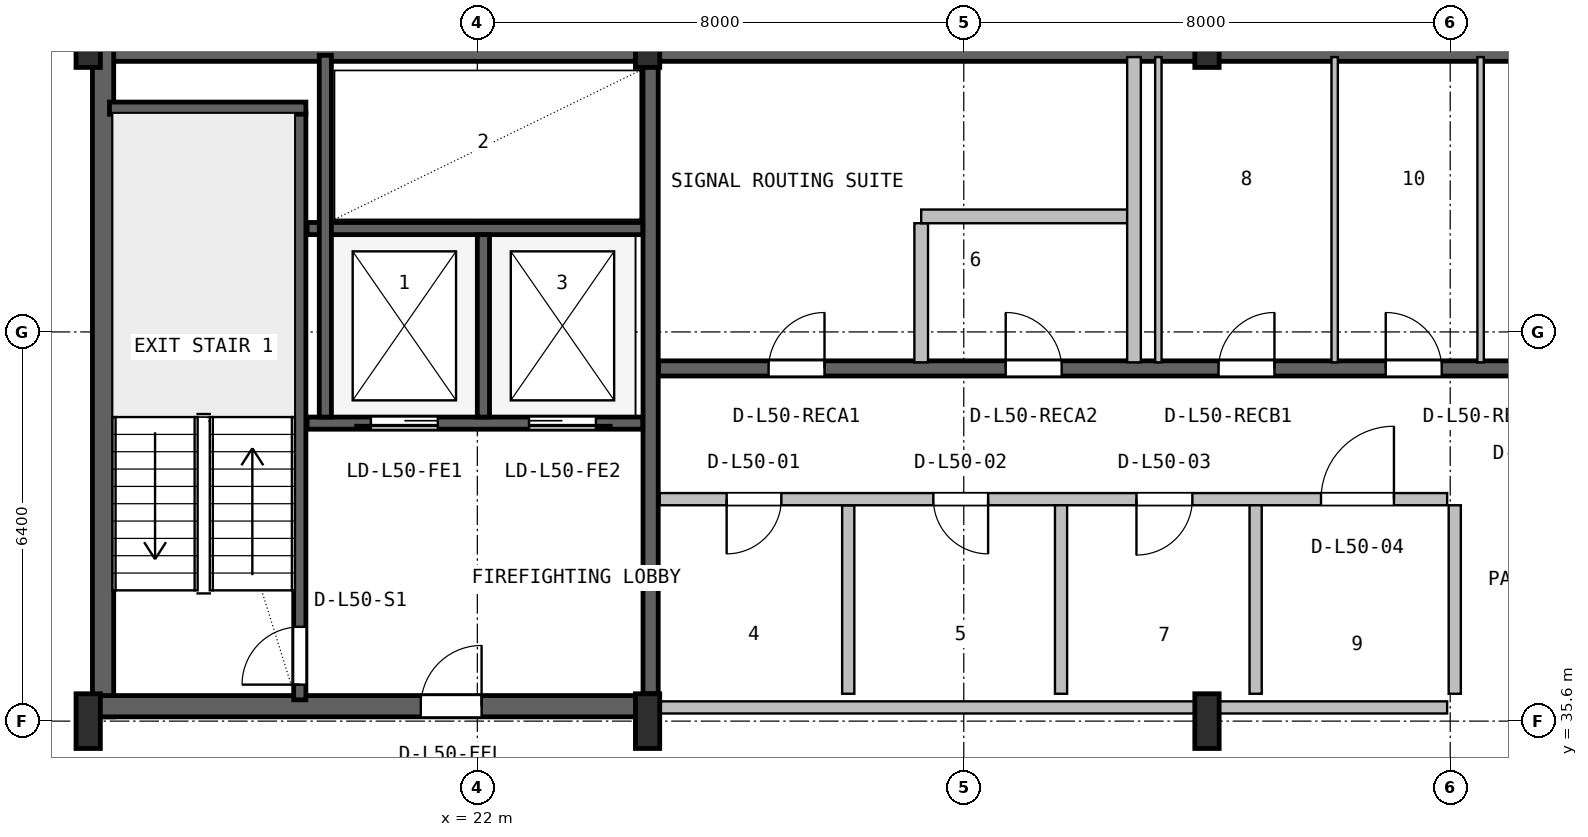
"""IFC4 building model, lengths in metres.
Left out: names, types, materials, properties, quantities, classifications, styles, units other than length and angle.
Written with IfcOpenShell. Run it as: python <this file> out.ifc"""

import sys

from ifc_helpers import new_model, si_unit, direction, frame, frame_2d, origin, origin_2d, place, context, subcontext, project, spatial, rectangle, i_section, extrude, source, transform, mapped, element, fill, save


model = new_model("IFC4")
c1 = context("Model", 3, precision=1e-05, world=origin(), true_north=direction((0.0, 1.0)))
c2 = subcontext(c1, "Body", "Model", "MODEL_VIEW")
j1 = project(units=[si_unit("LENGTHUNIT", "METRE"), si_unit("PLANEANGLEUNIT", "RADIAN")], contexts=[c1])
p1 = place(None, origin())
s1 = spatial("IfcSite", under=j1, at=p1, CompositionType="ELEMENT")
p2 = place(p1, origin())
s2 = spatial("IfcBuilding", under=s1, at=p2, CompositionType="ELEMENT")
p3 = place(p2, frame((0.0, 0.0, 203.6)))
s3 = spatial("IfcBuildingStorey", under=s2, at=p3, CompositionType="ELEMENT", Elevation=203.6)
p4 = place(p3, frame((15.6, 46.625, 0.0), z_axis=(0.0, 0.0, 1.0), x_axis=(1.0, 0.0, 0.0)))
e1 = element("IfcWall", 1, at=p4, inside=s3, PredefinedType="SHEAR", context=c2, shape_type="SweptSolid", body=[
    extrude(rectangle(XDim=36.8, YDim=0.35, at=frame_2d((18.4, 0.0))), origin(), (0.0, 0.0, 1.0), 3.55),
])
p5 = place(p3, frame((15.845, 35.67, 0.0), z_axis=(0.0, 0.0, 1.0), x_axis=(0.0, 1.0, 0.0)))
e2 = element("IfcWall", 2, at=p5, inside=s3, PredefinedType="SHEAR", context=c2, shape_type="SweptSolid", body=[
    extrude(rectangle(XDim=11.13, YDim=0.35, at=frame_2d((5.565, 0.0))), origin(), (0.0, 0.0, 1.0), 3.55),
])
p6 = place(p3, frame((15.67, 35.845, 0.0), z_axis=(0.0, 0.0, 1.0), x_axis=(1.0, 0.0, 0.0)))
e3 = element("IfcWall", 3, at=p6, inside=s3, PredefinedType="SHEAR", context=c2, shape_type="SweptSolid", body=[
    extrude(rectangle(XDim=9.13, YDim=0.35, at=frame_2d((4.565, 0.0))), origin(), (0.0, 0.0, 1.0), 3.55),
])
p7 = place(p6, frame((5.4, 0.0, 0.0)))
e4 = element("IfcOpeningElement", 4, at=p7, cuts=e3, PredefinedType="OPENING", context=c2, shape_type="SweptSolid", body=[
    extrude(rectangle(XDim=1.0, YDim=2.1, at=frame_2d((0.5, 1.05))), frame((0.0, 0.185, 0.0), z_axis=(0.0, -1.0, 0.0), x_axis=(1.0, 0.0, 0.0)), (0.0, 0.0, 1.0), 0.37),
])
m1 = source(origin(), c2, "Body", "SweptSolid", [
    extrude(i_section(OverallWidth=0.4, OverallDepth=0.9, WebThickness=0.016, FlangeThickness=0.028, FilletRadius=0.016, at=origin_2d()), origin(), (0.0, 0.0, 1.0), 3.8),
])
for number, where, z_axis, x_axis in (
    (5, (15.6, 35.6, 0.0), (0.0, 0.0, 1.0), (1.0, 0.0, 0.0)),
    (6, (15.6, 46.8, 0.0), (0.0, 0.0, 1.0), (1.0, 0.0, 0.0)),
    (7, (24.8, 35.6, 0.0), (0.0, 0.0, 1.0), (1.0, 0.0, 0.0)),
    (8, (24.8, 46.8, 0.0), (0.0, 0.0, 1.0), (1.0, 0.0, 0.0)),
    (9, (34.0, 35.6, 0.0), (0.0, 0.0, 1.0), (1.0, 0.0, 0.0)),
    (10, (34.0, 46.8, 0.0), (0.0, 0.0, 1.0), (1.0, 0.0, 0.0)),
):
    element("IfcColumn", number, at=place(p3, frame(where, z_axis=z_axis, x_axis=x_axis)), inside=s3, PredefinedType="COLUMN", context=c2, shape_type="MappedRepresentation", body=[
        mapped(m1, transform((0.0, 0.0, 0.0), x_axis=(1.0, 0.0, 0.0), y_axis=(0.0, 1.0, 0.0), z_axis=(0.0, 0.0, 1.0), scale=1.0)),
    ])
p8 = place(p3, frame((19.08, 35.95, 0.0), z_axis=(0.0, 0.0, 1.0), x_axis=(0.0, 1.0, 0.0)))
e11 = element("IfcWall", 11, at=p8, inside=s3, PredefinedType="SHEAR", context=c2, shape_type="SweptSolid", body=[
    extrude(rectangle(XDim=9.65, YDim=0.2, at=frame_2d((4.825, 0.0))), origin(), (0.0, 0.0, 1.0), 3.55),
])
p9 = place(p8, frame((0.25, 0.0, 0.0)))
e12 = element("IfcOpeningElement", 12, at=p9, cuts=e11, PredefinedType="OPENING", context=c2, shape_type="SweptSolid", body=[
    extrude(rectangle(XDim=0.95, YDim=2.1, at=frame_2d((0.475, 1.05))), frame((0.0, 0.11, 0.0), z_axis=(0.0, -1.0, 0.0), x_axis=(1.0, 0.0, 0.0)), (0.0, 0.0, 1.0), 0.22),
])
p10 = place(p3, frame((15.95, 45.68, 0.0), z_axis=(0.0, 0.0, 1.0), x_axis=(1.0, 0.0, 0.0)))
e13 = element("IfcWall", 13, at=p10, inside=s3, PredefinedType="SHEAR", context=c2, shape_type="SweptSolid", body=[
    extrude(rectangle(XDim=3.23, YDim=0.2, at=frame_2d((1.615, 0.0))), origin(), (0.0, 0.0, 1.0), 3.55),
])
p11 = place(p3, frame((24.85, 36.05, 0.0), z_axis=(0.0, 0.0, 1.0), x_axis=(0.0, 1.0, 0.0)))
e14 = element("IfcWall", 14, at=p11, inside=s3, PredefinedType="SHEAR", context=c2, shape_type="SweptSolid", body=[
    extrude(rectangle(XDim=10.45, YDim=0.25, at=frame_2d((5.225, 0.0))), origin(), (0.0, 0.0, 1.0), 3.55),
])
p12 = place(p3, frame((19.2, 40.5, 0.0), z_axis=(0.0, 0.0, 1.0), x_axis=(1.0, 0.0, 0.0)))
e15 = element("IfcWall", 15, at=p12, inside=s3, PredefinedType="SHEAR", context=c2, shape_type="SweptSolid", body=[
    extrude(rectangle(XDim=5.52, YDim=0.2, at=frame_2d((2.76, 0.0))), origin(), (0.0, 0.0, 1.0), 3.55),
])
p13 = place(p12, frame((1.05, 0.0, 0.0)))
e16 = element("IfcOpeningElement", 16, at=p13, cuts=e15, PredefinedType="OPENING", context=c2, shape_type="SweptSolid", body=[
    extrude(rectangle(XDim=1.1, YDim=2.18, at=frame_2d((0.55, 1.09))), frame((0.0, 0.11, 0.0), z_axis=(0.0, -1.0, 0.0), x_axis=(1.0, 0.0, 0.0)), (0.0, 0.0, 1.0), 0.22),
])
p14 = place(p12, frame((3.65, 0.0, 0.0)))
e17 = element("IfcOpeningElement", 17, at=p14, cuts=e15, PredefinedType="OPENING", context=c2, shape_type="SweptSolid", body=[
    extrude(rectangle(XDim=1.1, YDim=2.18, at=frame_2d((0.55, 1.09))), frame((0.0, 0.11, 0.0), z_axis=(0.0, -1.0, 0.0), x_axis=(1.0, 0.0, 0.0)), (0.0, 0.0, 1.0), 0.22),
])
p15 = place(p3, frame((19.2, 43.7, 0.0), z_axis=(0.0, 0.0, 1.0), x_axis=(1.0, 0.0, 0.0)))
e18 = element("IfcWall", 18, at=p15, inside=s3, PredefinedType="SHEAR", context=c2, shape_type="SweptSolid", body=[
    extrude(rectangle(XDim=5.52, YDim=0.2, at=frame_2d((2.76, 0.0))), origin(), (0.0, 0.0, 1.0), 3.55),
])
p16 = place(p3, frame((22.1, 40.6, 0.0), z_axis=(0.0, 0.0, 1.0), x_axis=(0.0, 1.0, 0.0)))
e19 = element("IfcWall", 19, at=p16, inside=s3, PredefinedType="SHEAR", context=c2, shape_type="SweptSolid", body=[
    extrude(rectangle(XDim=3.0, YDim=0.2, at=frame_2d((1.5, 0.0))), origin(), (0.0, 0.0, 1.0), 3.55),
])
p17 = place(p3, frame((19.5, 40.6, 0.0), z_axis=(0.0, 0.0, 1.0), x_axis=(0.0, 1.0, 0.0)))
e20 = element("IfcWall", 20, at=p17, inside=s3, PredefinedType="SHEAR", context=c2, shape_type="SweptSolid", body=[
    extrude(rectangle(XDim=5.95, YDim=0.2, at=frame_2d((2.975, 0.0))), origin(), (0.0, 0.0, 1.0), 3.55),
])
p18 = place(p3, frame((24.98, 41.4, 0.0), z_axis=(0.0, 0.0, 1.0), x_axis=(1.0, 0.0, 0.0)))
e21 = element("IfcWall", 21, at=p18, inside=s3, PredefinedType="SHEAR", context=c2, shape_type="SweptSolid", body=[
    extrude(rectangle(XDim=23.82, YDim=0.25, at=frame_2d((11.91, 0.0))), origin(), (0.0, 0.0, 1.0), 3.55),
])
p19 = place(p18, frame((16.87, 0.0, 0.0)))
e22 = element("IfcOpeningElement", 22, at=p19, cuts=e21, PredefinedType="OPENING", context=c2, shape_type="SweptSolid", body=[
    extrude(rectangle(XDim=1.1, YDim=2.18, at=frame_2d((0.55, 1.09))), frame((0.0, 0.135, 0.0), z_axis=(0.0, -1.0, 0.0), x_axis=(1.0, 0.0, 0.0)), (0.0, 0.0, 1.0), 0.27),
])
p20 = place(p18, frame((19.47, 0.0, 0.0)))
e23 = element("IfcOpeningElement", 23, at=p20, cuts=e21, PredefinedType="OPENING", context=c2, shape_type="SweptSolid", body=[
    extrude(rectangle(XDim=1.1, YDim=2.18, at=frame_2d((0.55, 1.09))), frame((0.0, 0.135, 0.0), z_axis=(0.0, -1.0, 0.0), x_axis=(1.0, 0.0, 0.0)), (0.0, 0.0, 1.0), 0.27),
])
p21 = place(p18, frame((22.07, 0.0, 0.0)))
e24 = element("IfcOpeningElement", 24, at=p21, cuts=e21, PredefinedType="OPENING", context=c2, shape_type="SweptSolid", body=[
    extrude(rectangle(XDim=1.1, YDim=2.18, at=frame_2d((0.55, 1.09))), frame((0.0, 0.135, 0.0), z_axis=(0.0, -1.0, 0.0), x_axis=(1.0, 0.0, 0.0)), (0.0, 0.0, 1.0), 0.27),
])
p22 = place(p18, frame((1.81, 0.0, 0.0)))
e25 = element("IfcOpeningElement", 25, at=p22, cuts=e21, PredefinedType="OPENING", context=c2, shape_type="SweptSolid", body=[
    extrude(rectangle(XDim=0.92, YDim=2.08, at=frame_2d((0.46, 1.04))), frame((0.0, 0.135, 0.0), z_axis=(0.0, -1.0, 0.0), x_axis=(1.0, 0.0, 0.0)), (0.0, 0.0, 1.0), 0.27),
])
p23 = place(p18, frame((5.71, 0.0, 0.0)))
e26 = element("IfcOpeningElement", 26, at=p23, cuts=e21, PredefinedType="OPENING", context=c2, shape_type="SweptSolid", body=[
    extrude(rectangle(XDim=0.92, YDim=2.08, at=frame_2d((0.46, 1.04))), frame((0.0, 0.135, 0.0), z_axis=(0.0, -1.0, 0.0), x_axis=(1.0, 0.0, 0.0)), (0.0, 0.0, 1.0), 0.27),
])
p24 = place(p18, frame((9.21, 0.0, 0.0)))
e27 = element("IfcOpeningElement", 27, at=p24, cuts=e21, PredefinedType="OPENING", context=c2, shape_type="SweptSolid", body=[
    extrude(rectangle(XDim=0.92, YDim=2.08, at=frame_2d((0.46, 1.04))), frame((0.0, 0.135, 0.0), z_axis=(0.0, -1.0, 0.0), x_axis=(1.0, 0.0, 0.0)), (0.0, 0.0, 1.0), 0.27),
])
p25 = place(p18, frame((11.96, 0.0, 0.0)))
e28 = element("IfcOpeningElement", 28, at=p25, cuts=e21, PredefinedType="OPENING", context=c2, shape_type="SweptSolid", body=[
    extrude(rectangle(XDim=0.92, YDim=2.08, at=frame_2d((0.46, 1.04))), frame((0.0, 0.135, 0.0), z_axis=(0.0, -1.0, 0.0), x_axis=(1.0, 0.0, 0.0)), (0.0, 0.0, 1.0), 0.27),
])
p26 = place(p18, frame((14.31, 0.0, 0.0)))
e29 = element("IfcOpeningElement", 29, at=p26, cuts=e21, PredefinedType="OPENING", context=c2, shape_type="SweptSolid", body=[
    extrude(rectangle(XDim=0.92, YDim=2.08, at=frame_2d((0.46, 1.04))), frame((0.0, 0.135, 0.0), z_axis=(0.0, -1.0, 0.0), x_axis=(1.0, 0.0, 0.0)), (0.0, 0.0, 1.0), 0.27),
])
p27 = place(p3, frame((25.0, 35.825, 0.0), z_axis=(0.0, 0.0, 1.0), x_axis=(1.0, 0.0, 0.0)))
e30 = element("IfcWall", 30, at=p27, inside=s3, PredefinedType="SOLIDWALL", context=c2, shape_type="SweptSolid", body=[
    extrude(rectangle(XDim=12.95, YDim=0.2, at=frame_2d((6.475, 0.0))), origin(), (0.0, 0.0, 1.0), 2.575),
])
p28 = place(p3, frame((28.1, 36.05, 0.0), z_axis=(0.0, 0.0, 1.0), x_axis=(0.0, 1.0, 0.0)))
e31 = element("IfcWall", 31, at=p28, inside=s3, PredefinedType="PLUMBINGWALL", context=c2, shape_type="SweptSolid", body=[
    extrude(rectangle(XDim=3.1, YDim=0.2, at=frame_2d((1.55, 0.0))), origin(), (0.0, 0.0, 1.0), 3.53),
])
p29 = place(p3, frame((25.0, 39.25, 0.0), z_axis=(0.0, 0.0, 1.0), x_axis=(1.0, 0.0, 0.0)))
e32 = element("IfcWall", 32, at=p29, inside=s3, PredefinedType="SOLIDWALL", context=c2, shape_type="SweptSolid", body=[
    extrude(rectangle(XDim=12.95, YDim=0.2, at=frame_2d((6.475, 0.0))), origin(), (0.0, 0.0, 1.0), 3.53),
])
p30 = place(p29, frame((1.1, 0.0, 0.0)))
e33 = element("IfcOpeningElement", 33, at=p30, cuts=e32, PredefinedType="OPENING", context=c2, shape_type="SweptSolid", body=[
    extrude(rectangle(XDim=0.9, YDim=2.06, at=frame_2d((0.45, 1.03))), frame((0.0, 0.11, 0.0), z_axis=(0.0, -1.0, 0.0), x_axis=(1.0, 0.0, 0.0)), (0.0, 0.0, 1.0), 0.22),
])
p31 = place(p29, frame((4.5, 0.0, 0.0)))
e34 = element("IfcOpeningElement", 34, at=p31, cuts=e32, PredefinedType="OPENING", context=c2, shape_type="SweptSolid", body=[
    extrude(rectangle(XDim=0.9, YDim=2.06, at=frame_2d((0.45, 1.03))), frame((0.0, 0.11, 0.0), z_axis=(0.0, -1.0, 0.0), x_axis=(1.0, 0.0, 0.0)), (0.0, 0.0, 1.0), 0.22),
])
p32 = place(p29, frame((7.84, 0.0, 0.0)))
e35 = element("IfcOpeningElement", 35, at=p32, cuts=e32, PredefinedType="OPENING", context=c2, shape_type="SweptSolid", body=[
    extrude(rectangle(XDim=0.92, YDim=2.08, at=frame_2d((0.46, 1.04))), frame((0.0, 0.11, 0.0), z_axis=(0.0, -1.0, 0.0), x_axis=(1.0, 0.0, 0.0)), (0.0, 0.0, 1.0), 0.22),
])
p33 = place(p29, frame((10.875, 0.0, 0.0)))
e36 = element("IfcOpeningElement", 36, at=p33, cuts=e32, PredefinedType="OPENING", context=c2, shape_type="SweptSolid", body=[
    extrude(rectangle(XDim=1.2, YDim=2.1, at=frame_2d((0.6, 1.05))), frame((0.0, 0.11, 0.0), z_axis=(0.0, -1.0, 0.0), x_axis=(1.0, 0.0, 0.0)), (0.0, 0.0, 1.0), 0.22),
])
p34 = place(p3, frame((31.6, 36.05, 0.0), z_axis=(0.0, 0.0, 1.0), x_axis=(0.0, 1.0, 0.0)))
e37 = element("IfcWall", 37, at=p34, inside=s3, PredefinedType="PLUMBINGWALL", context=c2, shape_type="SweptSolid", body=[
    extrude(rectangle(XDim=3.1, YDim=0.2, at=frame_2d((1.55, 0.0))), origin(), (0.0, 0.0, 1.0), 3.53),
])
for number, where, z_axis, x_axis in (
    (38, (34.8, 36.05, 0.0), (0.0, 0.0, 1.0), (0.0, 1.0, 0.0)),
    (39, (38.075, 36.05, 0.0), (0.0, 0.0, 1.0), (0.0, 1.0, 0.0)),
):
    element("IfcWall", number, at=place(p3, frame(where, z_axis=z_axis, x_axis=x_axis)), inside=s3, PredefinedType="SOLIDWALL", context=c2, shape_type="SweptSolid", body=[
        extrude(rectangle(XDim=3.1, YDim=0.2, at=frame_2d((1.55, 0.0))), origin(), (0.0, 0.0, 1.0), 3.53),
    ])
p35 = place(p3, frame((29.3, 41.5, 0.0), z_axis=(0.0, 0.0, 1.0), x_axis=(0.0, 1.0, 0.0)))
e40 = element("IfcWall", 40, at=p35, inside=s3, PredefinedType="PARTITIONING", context=c2, shape_type="SweptSolid", body=[
    extrude(rectangle(XDim=2.288, YDim=0.225, at=frame_2d((1.144, 0.0))), origin(), (0.0, 0.0, 1.0), 3.53),
])
p36 = place(p3, frame((29.3, 43.9, 0.0), z_axis=(0.0, 0.0, 1.0), x_axis=(1.0, 0.0, 0.0)))
e41 = element("IfcWall", 41, at=p36, inside=s3, PredefinedType="PARTITIONING", context=c2, shape_type="SweptSolid", body=[
    extrude(rectangle(XDim=3.5, YDim=0.225, at=frame_2d((1.75, 0.0))), origin(), (0.0, 0.0, 1.0), 3.53),
])
p37 = place(p3, frame((32.8, 41.5, 0.0), z_axis=(0.0, 0.0, 1.0), x_axis=(0.0, 1.0, 0.0)))
e42 = element("IfcWall", 42, at=p37, inside=s3, PredefinedType="PARTITIONING", context=c2, shape_type="SweptSolid", body=[
    extrude(rectangle(XDim=5.02, YDim=0.225, at=frame_2d((2.51, 0.0))), origin(), (0.0, 0.0, 1.0), 3.53),
])
for number, where, z_axis, x_axis in (
    (43, (36.1, 41.5, 0.0), (0.0, 0.0, 1.0), (0.0, 1.0, 0.0)),
    (44, (33.2, 41.5, 0.0), (0.0, 0.0, 1.0), (0.0, 1.0, 0.0)),
    (45, (38.5, 41.5, 0.0), (0.0, 0.0, 1.0), (0.0, 1.0, 0.0)),
):
    element("IfcWall", number, at=place(p3, frame(where, z_axis=z_axis, x_axis=x_axis)), inside=s3, PredefinedType="PARTITIONING", context=c2, shape_type="SweptSolid", body=[
        extrude(rectangle(XDim=5.02, YDim=0.105, at=frame_2d((2.51, 0.0))), origin(), (0.0, 0.0, 1.0), 3.53),
    ])
m2 = source(origin(), c2, "Body", "SweptSolid", [
    extrude(rectangle(XDim=0.95, YDim=2.1, at=frame_2d((0.475, 1.05))), frame((0.0, 0.025, 0.0), z_axis=(0.0, -1.0, 0.0), x_axis=(1.0, 0.0, 0.0)), (0.0, 0.0, 1.0), 0.05),
])
p38 = place(p9, origin())
e46 = element("IfcDoor", 46, at=p38, inside=s3, OperationType="SINGLE_SWING_LEFT", PredefinedType="DOOR", context=c2, shape_type="MappedRepresentation", body=[
    mapped(m2, transform((0.0, 0.0, 0.0), x_axis=(1.0, 0.0, 0.0), y_axis=(0.0, 1.0, 0.0), z_axis=(0.0, 0.0, 1.0), scale=1.0)),
])
fill(e12, e46)
m3 = source(origin(), c2, "Body", "SweptSolid", [
    extrude(rectangle(XDim=1.0, YDim=2.1, at=frame_2d((0.5, 1.05))), frame((0.0, 0.025, 0.0), z_axis=(0.0, -1.0, 0.0), x_axis=(1.0, 0.0, 0.0)), (0.0, 0.0, 1.0), 0.05),
])
p39 = place(p7, origin())
e47 = element("IfcDoor", 47, at=p39, inside=s3, OperationType="SINGLE_SWING_RIGHT", PredefinedType="DOOR", context=c2, shape_type="MappedRepresentation", body=[
    mapped(m3, transform((0.0, 0.0, 0.0), x_axis=(1.0, 0.0, 0.0), y_axis=(0.0, 1.0, 0.0), z_axis=(0.0, 0.0, 1.0), scale=1.0)),
])
fill(e4, e47)
m4 = source(origin(), c2, "Body", "SweptSolid", [
    extrude(rectangle(XDim=1.1, YDim=2.18, at=frame_2d((0.55, 1.09))), frame((0.0, 0.025, 0.0), z_axis=(0.0, -1.0, 0.0), x_axis=(1.0, 0.0, 0.0)), (0.0, 0.0, 1.0), 0.05),
])
p40 = place(p13, frame((1.1, 0.0, 0.0), z_axis=(0.0, 0.0, 1.0), x_axis=(-1.0, 0.0, 0.0)))
e48 = element("IfcDoor", 48, at=p40, inside=s3, OperationType="SLIDING_TO_LEFT", PredefinedType="DOOR", context=c2, shape_type="MappedRepresentation", body=[
    mapped(m4, transform((0.0, 0.0, 0.0), x_axis=(1.0, 0.0, 0.0), y_axis=(0.0, 1.0, 0.0), z_axis=(0.0, 0.0, 1.0), scale=1.0)),
])
fill(e16, e48)
p41 = place(p14, frame((1.1, 0.0, 0.0), z_axis=(0.0, 0.0, 1.0), x_axis=(-1.0, 0.0, 0.0)))
e49 = element("IfcDoor", 49, at=p41, inside=s3, OperationType="SLIDING_TO_RIGHT", PredefinedType="DOOR", context=c2, shape_type="MappedRepresentation", body=[
    mapped(m4, transform((0.0, 0.0, 0.0), x_axis=(1.0, 0.0, 0.0), y_axis=(0.0, 1.0, 0.0), z_axis=(0.0, 0.0, 1.0), scale=1.0)),
])
fill(e17, e49)
m5 = source(origin(), c2, "Body", "SweptSolid", [
    extrude(rectangle(XDim=0.92, YDim=2.08, at=frame_2d((0.46, 1.04))), frame((0.0, 0.025, 0.0), z_axis=(0.0, -1.0, 0.0), x_axis=(1.0, 0.0, 0.0)), (0.0, 0.0, 1.0), 0.05),
])
p42 = place(p22, origin())
e50 = element("IfcDoor", 50, at=p42, inside=s3, OperationType="SINGLE_SWING_RIGHT", PredefinedType="DOOR", context=c2, shape_type="MappedRepresentation", body=[
    mapped(m5, transform((0.0, 0.0, 0.0), x_axis=(1.0, 0.0, 0.0), y_axis=(0.0, 1.0, 0.0), z_axis=(0.0, 0.0, 1.0), scale=1.0)),
])
fill(e25, e50)
p43 = place(p23, origin())
e51 = element("IfcDoor", 51, at=p43, inside=s3, OperationType="SINGLE_SWING_LEFT", PredefinedType="DOOR", context=c2, shape_type="MappedRepresentation", body=[
    mapped(m5, transform((0.0, 0.0, 0.0), x_axis=(1.0, 0.0, 0.0), y_axis=(0.0, 1.0, 0.0), z_axis=(0.0, 0.0, 1.0), scale=1.0)),
])
fill(e26, e51)
p44 = place(p24, origin())
e52 = element("IfcDoor", 52, at=p44, inside=s3, OperationType="SINGLE_SWING_RIGHT", PredefinedType="DOOR", context=c2, shape_type="MappedRepresentation", body=[
    mapped(m5, transform((0.0, 0.0, 0.0), x_axis=(1.0, 0.0, 0.0), y_axis=(0.0, 1.0, 0.0), z_axis=(0.0, 0.0, 1.0), scale=1.0)),
])
fill(e27, e52)
p45 = place(p25, origin())
e53 = element("IfcDoor", 53, at=p45, inside=s3, OperationType="SINGLE_SWING_LEFT", PredefinedType="DOOR", context=c2, shape_type="MappedRepresentation", body=[
    mapped(m5, transform((0.0, 0.0, 0.0), x_axis=(1.0, 0.0, 0.0), y_axis=(0.0, 1.0, 0.0), z_axis=(0.0, 0.0, 1.0), scale=1.0)),
])
fill(e28, e53)
m6 = source(origin(), c2, "Body", "SweptSolid", [
    extrude(rectangle(XDim=0.9, YDim=2.06, at=frame_2d((0.45, 1.03))), frame((0.0, 0.025, 0.0), z_axis=(0.0, -1.0, 0.0), x_axis=(1.0, 0.0, 0.0)), (0.0, 0.0, 1.0), 0.05),
])
p46 = place(p30, frame((0.9, 0.0, 0.0), z_axis=(0.0, 0.0, 1.0), x_axis=(-1.0, 0.0, 0.0)))
e54 = element("IfcDoor", 54, at=p46, inside=s3, OperationType="SINGLE_SWING_LEFT", PredefinedType="DOOR", context=c2, shape_type="MappedRepresentation", body=[
    mapped(m6, transform((0.0, 0.0, 0.0), x_axis=(1.0, 0.0, 0.0), y_axis=(0.0, 1.0, 0.0), z_axis=(0.0, 0.0, 1.0), scale=1.0)),
])
fill(e33, e54)
p47 = place(p31, frame((0.9, 0.0, 0.0), z_axis=(0.0, 0.0, 1.0), x_axis=(-1.0, 0.0, 0.0)))
e55 = element("IfcDoor", 55, at=p47, inside=s3, OperationType="SINGLE_SWING_RIGHT", PredefinedType="DOOR", context=c2, shape_type="MappedRepresentation", body=[
    mapped(m6, transform((0.0, 0.0, 0.0), x_axis=(1.0, 0.0, 0.0), y_axis=(0.0, 1.0, 0.0), z_axis=(0.0, 0.0, 1.0), scale=1.0)),
])
fill(e34, e55)
p48 = place(p32, frame((0.92, 0.0, 0.0), z_axis=(0.0, 0.0, 1.0), x_axis=(-1.0, 0.0, 0.0)))
e56 = element("IfcDoor", 56, at=p48, inside=s3, OperationType="SINGLE_SWING_LEFT", PredefinedType="DOOR", context=c2, shape_type="MappedRepresentation", body=[
    mapped(m5, transform((0.0, 0.0, 0.0), x_axis=(1.0, 0.0, 0.0), y_axis=(0.0, 1.0, 0.0), z_axis=(0.0, 0.0, 1.0), scale=1.0)),
])
fill(e35, e56)
m7 = source(origin(), c2, "Body", "SweptSolid", [
    extrude(rectangle(XDim=1.2, YDim=2.1, at=frame_2d((0.6, 1.05))), frame((0.0, 0.025, 0.0), z_axis=(0.0, -1.0, 0.0), x_axis=(1.0, 0.0, 0.0)), (0.0, 0.0, 1.0), 0.05),
])
p49 = place(p33, origin())
e57 = element("IfcDoor", 57, at=p49, inside=s3, OperationType="SINGLE_SWING_RIGHT", PredefinedType="DOOR", context=c2, shape_type="MappedRepresentation", body=[
    mapped(m7, transform((0.0, 0.0, 0.0), x_axis=(1.0, 0.0, 0.0), y_axis=(0.0, 1.0, 0.0), z_axis=(0.0, 0.0, 1.0), scale=1.0)),
])
fill(e36, e57)
save(model, sys.argv[1])
